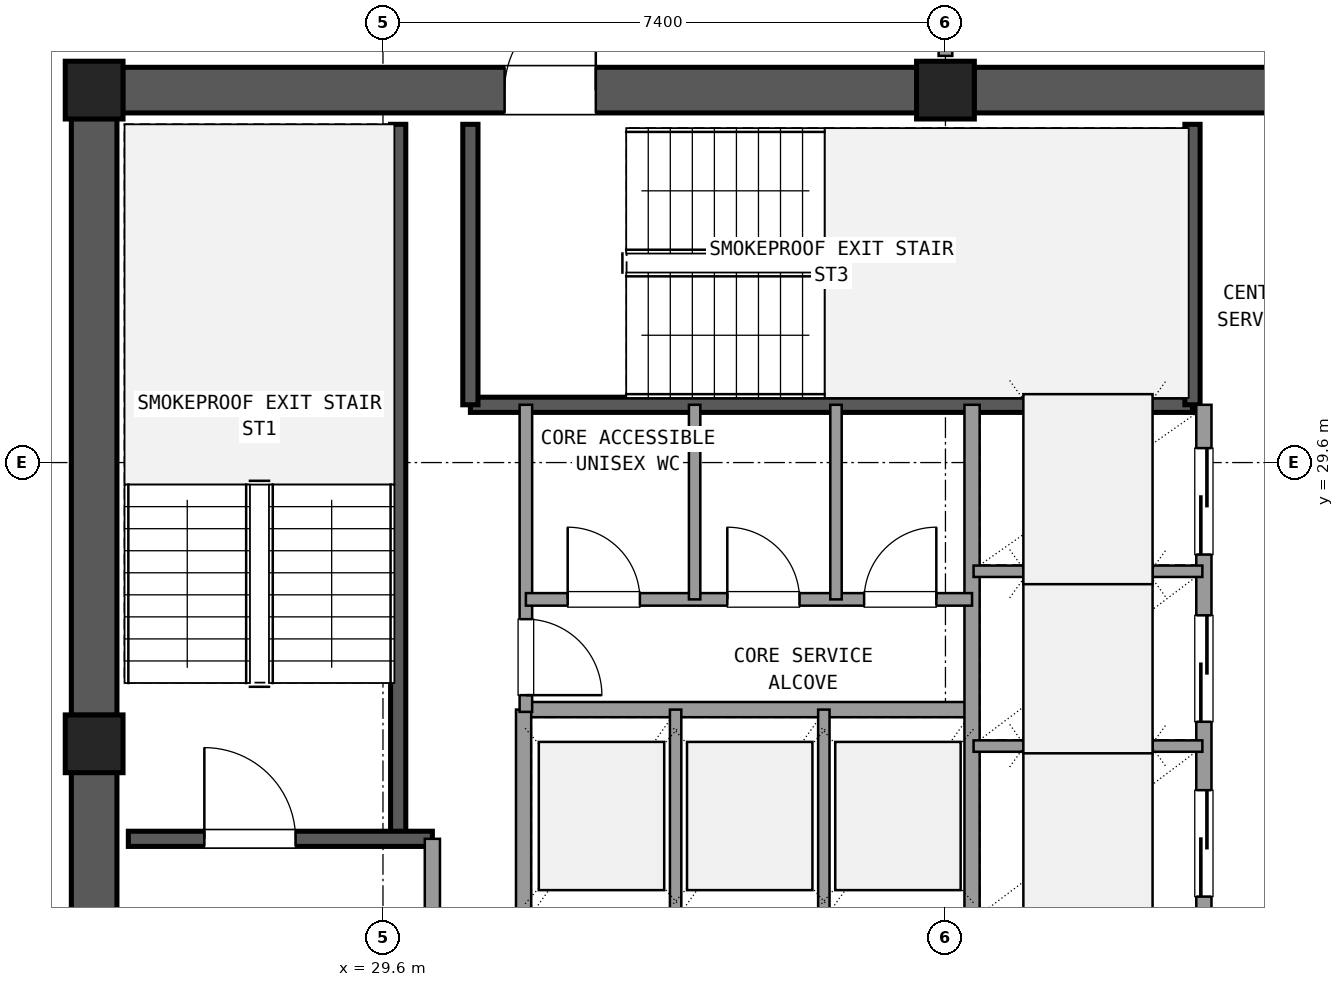
"""IFC4 building model, lengths in metres.
Left out: names, types, materials, properties, quantities, classifications, styles, units other than length and angle.
Written with IfcOpenShell. Run it as: python <this file> out.ifc"""

import sys

from ifc_helpers import new_model, si_unit, direction, frame, frame_2d, origin, origin_2d, place, context, subcontext, project, spatial, rectangle, extrude, element, fill, save


model = new_model("IFC4")
c1 = context("Model", 3, precision=1e-05, world=origin(), true_north=direction((0.0, 1.0)))
c2 = subcontext(c1, "Body", "Model", "MODEL_VIEW")
j1 = project(units=[si_unit("LENGTHUNIT", "METRE"), si_unit("PLANEANGLEUNIT", "RADIAN")], contexts=[c1])
p1 = place(None, origin())
s1 = spatial("IfcSite", under=j1, at=p1, CompositionType="ELEMENT")
p2 = place(p1, origin())
s2 = spatial("IfcBuilding", under=s1, at=p2, CompositionType="ELEMENT")
p3 = place(p2, frame((0.0, 0.0, 282.42)))
s3 = spatial("IfcBuildingStorey", under=s2, at=p3, CompositionType="ELEMENT", Elevation=282.42)
for number, where, z_axis, x_axis in (
    (1, (37.0, 34.5, 0.0), (0.0, 0.0, 1.0), (1.0, 0.0, 0.0)),
    (2, (25.8, 34.5, 0.0), (0.0, 0.0, 1.0), (1.0, 0.0, 0.0)),
    (3, (25.8, 25.9, 0.0), (0.0, 0.0, 1.0), (1.0, 0.0, 0.0)),
):
    element("IfcColumn", number, at=place(p3, frame(where, z_axis=z_axis, x_axis=x_axis)), inside=s3, PredefinedType="COLUMN", context=c2, shape_type="SweptSolid", body=[
        extrude(rectangle(XDim=0.76, YDim=0.76, at=origin_2d()), origin(), (0.0, 0.0, 1.0), 3.6),
    ])
p4 = place(p3, frame((47.825, 34.5, 0.0), z_axis=(0.0, 0.0, 1.0), x_axis=(-1.0, 0.0, 0.0)))
e4 = element("IfcWall", 4, at=p4, inside=s3, PredefinedType="SHEAR", context=c2, shape_type="SweptSolid", body=[
    extrude(rectangle(XDim=10.45, YDim=0.6, at=frame_2d((5.225, 0.0))), origin(), (0.0, 0.0, 1.0), 3.32),
])
p5 = place(p4, frame((4.725, 0.0, 0.0)))
e5 = element("IfcOpeningElement", 5, at=p5, cuts=e4, PredefinedType="OPENING", context=c2, shape_type="SweptSolid", body=[
    extrude(rectangle(XDim=1.6, YDim=2.2, at=frame_2d((0.8, 1.1))), frame((0.0, 0.31, 0.0), z_axis=(0.0, -1.0, 0.0), x_axis=(1.0, 0.0, 0.0)), (0.0, 0.0, 1.0), 0.62),
])
p6 = place(p3, frame((36.625, 34.5, 0.0), z_axis=(0.0, 0.0, 1.0), x_axis=(-1.0, 0.0, 0.0)))
e6 = element("IfcWall", 6, at=p6, inside=s3, PredefinedType="SHEAR", context=c2, shape_type="SweptSolid", body=[
    extrude(rectangle(XDim=10.45, YDim=0.6, at=frame_2d((5.225, 0.0))), origin(), (0.0, 0.0, 1.0), 3.32),
])
p7 = place(p6, frame((4.225, 0.0, 0.0)))
e7 = element("IfcOpeningElement", 7, at=p7, cuts=e6, PredefinedType="OPENING", context=c2, shape_type="SweptSolid", body=[
    extrude(rectangle(XDim=1.2, YDim=2.15, at=frame_2d((0.6, 1.075))), frame((0.0, 0.31, 0.0), z_axis=(0.0, -1.0, 0.0), x_axis=(1.0, 0.0, 0.0)), (0.0, 0.0, 1.0), 0.62),
])
p8 = place(p3, frame((25.8, 34.125, 0.0), z_axis=(0.0, 0.0, 1.0), x_axis=(0.0, -1.0, 0.0)))
e8 = element("IfcWall", 8, at=p8, inside=s3, PredefinedType="SHEAR", context=c2, shape_type="SweptSolid", body=[
    extrude(rectangle(XDim=7.85, YDim=0.6, at=frame_2d((3.925, 0.0))), origin(), (0.0, 0.0, 1.0), 3.32),
])
p9 = place(p3, frame((25.8, 25.525, 0.0), z_axis=(0.0, 0.0, 1.0), x_axis=(0.0, -1.0, 0.0)))
e9 = element("IfcWall", 9, at=p9, inside=s3, PredefinedType="SHEAR", context=c2, shape_type="SweptSolid", body=[
    extrude(rectangle(XDim=7.85, YDim=0.6, at=frame_2d((3.925, 0.0))), origin(), (0.0, 0.0, 1.0), 3.32),
])
p10 = place(p9, frame((2.275, 0.0, 0.0)))
e10 = element("IfcOpeningElement", 10, at=p10, cuts=e9, PredefinedType="OPENING", context=c2, shape_type="SweptSolid", body=[
    extrude(rectangle(XDim=1.2, YDim=2.15, at=frame_2d((0.6, 1.075))), frame((0.0, 0.31, 0.0), z_axis=(0.0, -1.0, 0.0), x_axis=(1.0, 0.0, 0.0)), (0.0, 0.0, 1.0), 0.62),
])
p11 = place(p3, frame((29.8, 24.65, 0.0), z_axis=(0.0, 0.0, 1.0), x_axis=(0.0, 1.0, 0.0)))
e11 = element("IfcWall", 11, at=p11, inside=s3, PredefinedType="SHEAR", context=c2, shape_type="SweptSolid", body=[
    extrude(rectangle(XDim=9.4, YDim=0.2, at=frame_2d((4.7, 0.0))), origin(), (0.0, 0.0, 1.0), 3.32),
])
p12 = place(p3, frame((26.25, 24.65, 0.0), z_axis=(0.0, 0.0, 1.0), x_axis=(1.0, 0.0, 0.0)))
e12 = element("IfcWall", 12, at=p12, inside=s3, PredefinedType="SHEAR", context=c2, shape_type="SweptSolid", body=[
    extrude(rectangle(XDim=4.0, YDim=0.2, at=frame_2d((2.0, 0.0))), origin(), (0.0, 0.0, 1.0), 3.32),
])
p13 = place(p12, frame((1.0, 0.0, 0.0)))
e13 = element("IfcOpeningElement", 13, at=p13, cuts=e12, PredefinedType="OPENING", context=c2, shape_type="SweptSolid", body=[
    extrude(rectangle(XDim=1.2, YDim=2.15, at=frame_2d((0.6, 1.075))), frame((0.0, 0.11, 0.0), z_axis=(0.0, -1.0, 0.0), x_axis=(1.0, 0.0, 0.0)), (0.0, 0.0, 1.0), 0.22),
])
p14 = place(p3, frame((30.75, 30.36, 0.0), z_axis=(0.0, 0.0, 1.0), x_axis=(1.0, 0.0, 0.0)))
e14 = element("IfcWall", 14, at=p14, inside=s3, PredefinedType="SHEAR", context=c2, shape_type="SweptSolid", body=[
    extrude(rectangle(XDim=9.5, YDim=0.2, at=frame_2d((4.75, 0.0))), origin(), (0.0, 0.0, 1.0), 3.32),
])
for number, where, z_axis, x_axis in (
    (15, (30.75, 30.36, 0.0), (0.0, 0.0, 1.0), (0.0, 1.0, 0.0)),
    (16, (40.25, 30.36, 0.0), (0.0, 0.0, 1.0), (0.0, 1.0, 0.0)),
):
    element("IfcWall", number, at=place(p3, frame(where, z_axis=z_axis, x_axis=x_axis)), inside=s3, PredefinedType="SHEAR", context=c2, shape_type="SweptSolid", body=[
        extrude(rectangle(XDim=3.69, YDim=0.2, at=frame_2d((1.845, 0.0))), origin(), (0.0, 0.0, 1.0), 3.32),
    ])
p15 = place(p3, frame((30.25, 17.75, 0.0), z_axis=(0.0, 0.0, 1.0), x_axis=(0.0, 1.0, 0.0)))
e17 = element("IfcWall", 17, at=p15, inside=s3, PredefinedType="SOLIDWALL", context=c2, shape_type="SweptSolid", body=[
    extrude(rectangle(XDim=6.9, YDim=0.2, at=frame_2d((3.45, 0.0))), origin(), (0.0, 0.0, 1.0), 2.24),
])
p16 = place(p15, frame((4.15, 0.0, 0.0)))
e18 = element("IfcOpeningElement", 18, at=p16, cuts=e17, PredefinedType="OPENING", context=c2, shape_type="SweptSolid", body=[
    extrude(rectangle(XDim=1.2, YDim=2.15, at=frame_2d((0.6, 1.075))), frame((0.0, 0.11, 0.0), z_axis=(0.0, -1.0, 0.0), x_axis=(1.0, 0.0, 0.0)), (0.0, 0.0, 1.0), 0.22),
])
p17 = place(p3, frame((31.45, 26.35, 0.0), z_axis=(0.0, 0.0, 1.0), x_axis=(1.0, 0.0, 0.0)))
e19 = element("IfcWall", 19, at=p17, inside=s3, PredefinedType="SOLIDWALL", context=c2, shape_type="SweptSolid", body=[
    extrude(rectangle(XDim=5.9, YDim=0.2, at=frame_2d((2.95, 0.0))), origin(), (0.0, 0.0, 1.0), 2.24),
])
p18 = place(p3, frame((31.45, 23.54, 0.0), z_axis=(0.0, 0.0, 1.0), x_axis=(0.0, 1.0, 0.0)))
e20 = element("IfcWall", 20, at=p18, inside=s3, PredefinedType="SOLIDWALL", context=c2, shape_type="SweptSolid", body=[
    extrude(rectangle(XDim=2.81, YDim=0.2, at=frame_2d((1.405, 0.0))), origin(), (0.0, 0.0, 1.0), 2.24),
])
for number, where, z_axis, x_axis in (
    (21, (33.45, 23.54, 0.0), (0.0, 0.0, 1.0), (0.0, 1.0, 0.0)),
    (22, (35.4, 23.54, 0.0), (0.0, 0.0, 1.0), (0.0, 1.0, 0.0)),
):
    element("IfcWall", number, at=place(p3, frame(where, z_axis=z_axis, x_axis=x_axis)), inside=s3, PredefinedType="PARTITIONING", context=c2, shape_type="SweptSolid", body=[
        extrude(rectangle(XDim=2.81, YDim=0.15, at=frame_2d((1.405, 0.0))), origin(), (0.0, 0.0, 1.0), 2.24),
    ])
p19 = place(p3, frame((37.35, 23.54, 0.0), z_axis=(0.0, 0.0, 1.0), x_axis=(0.0, 1.0, 0.0)))
e23 = element("IfcWall", 23, at=p19, inside=s3, PredefinedType="SOLIDWALL", context=c2, shape_type="SweptSolid", body=[
    extrude(rectangle(XDim=6.82, YDim=0.2, at=frame_2d((3.41, 0.0))), origin(), (0.0, 0.0, 1.0), 2.24),
])
p20 = place(p3, frame((40.4, 23.54, 0.0), z_axis=(0.0, 0.0, 1.0), x_axis=(0.0, 1.0, 0.0)))
e24 = element("IfcWall", 24, at=p20, inside=s3, PredefinedType="SOLIDWALL", context=c2, shape_type="SweptSolid", body=[
    extrude(rectangle(XDim=6.82, YDim=0.2, at=frame_2d((3.41, 0.0))), origin(), (0.0, 0.0, 1.0), 2.24),
])
p21 = place(p20, frame((0.35, 0.0, 0.0)))
e25 = element("IfcOpeningElement", 25, at=p21, cuts=e24, PredefinedType="OPENING", context=c2, shape_type="SweptSolid", body=[
    extrude(rectangle(XDim=1.4, YDim=2.2, at=frame_2d((0.7, 1.1))), frame((0.0, 0.11, 0.0), z_axis=(0.0, -1.0, 0.0), x_axis=(1.0, 0.0, 0.0)), (0.0, 0.0, 1.0), 0.22),
])
p22 = place(p20, frame((2.65, 0.0, 0.0)))
e26 = element("IfcOpeningElement", 26, at=p22, cuts=e24, PredefinedType="OPENING", context=c2, shape_type="SweptSolid", body=[
    extrude(rectangle(XDim=1.4, YDim=2.2, at=frame_2d((0.7, 1.1))), frame((0.0, 0.11, 0.0), z_axis=(0.0, -1.0, 0.0), x_axis=(1.0, 0.0, 0.0)), (0.0, 0.0, 1.0), 0.22),
])
p23 = place(p20, frame((4.85, 0.0, 0.0)))
e27 = element("IfcOpeningElement", 27, at=p23, cuts=e24, PredefinedType="OPENING", context=c2, shape_type="SweptSolid", body=[
    extrude(rectangle(XDim=1.4, YDim=2.2, at=frame_2d((0.7, 1.1))), frame((0.0, 0.11, 0.0), z_axis=(0.0, -1.0, 0.0), x_axis=(1.0, 0.0, 0.0)), (0.0, 0.0, 1.0), 0.22),
])
for number, where, z_axis, x_axis in (
    (28, (37.37, 25.87, 0.0), (0.0, 0.0, 1.0), (1.0, 0.0, 0.0)),
    (29, (37.37, 28.17, 0.0), (0.0, 0.0, 1.0), (1.0, 0.0, 0.0)),
):
    element("IfcWall", number, at=place(p3, frame(where, z_axis=z_axis, x_axis=x_axis)), inside=s3, PredefinedType="PARTITIONING", context=c2, shape_type="SweptSolid", body=[
        extrude(rectangle(XDim=3.01, YDim=0.15, at=frame_2d((1.505, 0.0))), origin(), (0.0, 0.0, 1.0), 2.24),
    ])
p24 = place(p3, frame((31.48, 26.32, 0.0), z_axis=(0.0, 0.0, 1.0), x_axis=(0.0, 1.0, 0.0)))
e30 = element("IfcWall", 30, at=p24, inside=s3, PredefinedType="PLUMBINGWALL", context=c2, shape_type="SweptSolid", body=[
    extrude(rectangle(XDim=4.04, YDim=0.165, at=frame_2d((2.02, 0.0))), origin(), (0.0, 0.0, 1.0), 2.24),
])
p25 = place(p24, frame((0.22, 0.0, 0.0)))
e31 = element("IfcOpeningElement", 31, at=p25, cuts=e30, PredefinedType="OPENING", context=c2, shape_type="SweptSolid", body=[
    extrude(rectangle(XDim=1.0, YDim=2.15, at=frame_2d((0.5, 1.075))), frame((0.0, 0.093, 0.0), z_axis=(0.0, -1.0, 0.0), x_axis=(1.0, 0.0, 0.0)), (0.0, 0.0, 1.0), 0.185),
])
p26 = place(p3, frame((31.48, 27.8, 0.0), z_axis=(0.0, 0.0, 1.0), x_axis=(1.0, 0.0, 0.0)))
e32 = element("IfcWall", 32, at=p26, inside=s3, PredefinedType="PLUMBINGWALL", context=c2, shape_type="SweptSolid", body=[
    extrude(rectangle(XDim=5.87, YDim=0.165, at=frame_2d((2.935, 0.0))), origin(), (0.0, 0.0, 1.0), 2.24),
])
p27 = place(p26, frame((0.55, 0.0, 0.0)))
e33 = element("IfcOpeningElement", 33, at=p27, cuts=e32, PredefinedType="OPENING", context=c2, shape_type="SweptSolid", body=[
    extrude(rectangle(XDim=0.95, YDim=2.1, at=frame_2d((0.475, 1.05))), frame((0.0, 0.093, 0.0), z_axis=(0.0, -1.0, 0.0), x_axis=(1.0, 0.0, 0.0)), (0.0, 0.0, 1.0), 0.185),
])
p28 = place(p26, frame((2.65, 0.0, 0.0)))
e34 = element("IfcOpeningElement", 34, at=p28, cuts=e32, PredefinedType="OPENING", context=c2, shape_type="SweptSolid", body=[
    extrude(rectangle(XDim=0.95, YDim=2.1, at=frame_2d((0.475, 1.05))), frame((0.0, 0.093, 0.0), z_axis=(0.0, -1.0, 0.0), x_axis=(1.0, 0.0, 0.0)), (0.0, 0.0, 1.0), 0.185),
])
p29 = place(p26, frame((4.45, 0.0, 0.0)))
e35 = element("IfcOpeningElement", 35, at=p29, cuts=e32, PredefinedType="OPENING", context=c2, shape_type="SweptSolid", body=[
    extrude(rectangle(XDim=0.95, YDim=2.1, at=frame_2d((0.475, 1.05))), frame((0.0, 0.093, 0.0), z_axis=(0.0, -1.0, 0.0), x_axis=(1.0, 0.0, 0.0)), (0.0, 0.0, 1.0), 0.185),
])
for number, where, z_axis, x_axis in (
    (36, (33.7, 27.8, 0.0), (0.0, 0.0, 1.0), (0.0, 1.0, 0.0)),
    (37, (35.56, 27.8, 0.0), (0.0, 0.0, 1.0), (0.0, 1.0, 0.0)),
):
    element("IfcWall", number, at=place(p3, frame(where, z_axis=z_axis, x_axis=x_axis)), inside=s3, PredefinedType="PARTITIONING", context=c2, shape_type="SweptSolid", body=[
        extrude(rectangle(XDim=2.56, YDim=0.15, at=frame_2d((1.28, 0.0))), origin(), (0.0, 0.0, 1.0), 2.24),
    ])
p30 = place(p3, frame((37.0, 34.95, 0.0), z_axis=(0.0, 0.0, 1.0), x_axis=(0.0, 1.0, 0.0)))
e38 = element("IfcWall", 38, at=p30, inside=s3, PredefinedType="PARTITIONING", context=c2, shape_type="SweptSolid", body=[
    extrude(rectangle(XDim=2.7, YDim=0.18, at=frame_2d((1.35, 0.0))), origin(), (0.0, 0.0, 1.0), 2.24),
])
p31 = place(p30, frame((0.35, 0.0, 0.0)))
e39 = element("IfcOpeningElement", 39, at=p31, cuts=e38, PredefinedType="OPENING", context=c2, shape_type="SweptSolid", body=[
    extrude(rectangle(XDim=2.0, YDim=2.2, at=frame_2d((1.0, 1.1))), frame((0.0, 0.1, 0.0), z_axis=(0.0, -1.0, 0.0), x_axis=(1.0, 0.0, 0.0)), (0.0, 0.0, 1.0), 0.2),
])
p32 = place(p13, origin())
e40 = element("IfcDoor", 40, at=p32, inside=s3, OperationType="SINGLE_SWING_LEFT", PredefinedType="DOOR", context=c2, shape_type="SweptSolid", body=[
    extrude(rectangle(XDim=1.2, YDim=2.15, at=frame_2d((0.6, 1.075))), frame((0.0, 0.025, 0.0), z_axis=(0.0, -1.0, 0.0), x_axis=(1.0, 0.0, 0.0)), (0.0, 0.0, 1.0), 0.05),
])
fill(e13, e40)
p33 = place(p7, frame((1.2, 0.0, 0.0), z_axis=(0.0, 0.0, 1.0), x_axis=(-1.0, 0.0, 0.0)))
e41 = element("IfcDoor", 41, at=p33, inside=s3, OperationType="SINGLE_SWING_LEFT", PredefinedType="DOOR", context=c2, shape_type="SweptSolid", body=[
    extrude(rectangle(XDim=1.2, YDim=2.15, at=frame_2d((0.6, 1.075))), frame((0.0, 0.025, 0.0), z_axis=(0.0, -1.0, 0.0), x_axis=(1.0, 0.0, 0.0)), (0.0, 0.0, 1.0), 0.05),
])
fill(e7, e41)
p34 = place(p21, origin())
e42 = element("IfcDoor", 42, at=p34, inside=s3, OperationType="SLIDING_TO_LEFT", PredefinedType="DOOR", context=c2, shape_type="SweptSolid", body=[
    extrude(rectangle(XDim=1.4, YDim=2.2, at=frame_2d((0.7, 1.1))), frame((0.0, 0.025, 0.0), z_axis=(0.0, -1.0, 0.0), x_axis=(1.0, 0.0, 0.0)), (0.0, 0.0, 1.0), 0.05),
])
fill(e25, e42)
p35 = place(p22, origin())
e43 = element("IfcDoor", 43, at=p35, inside=s3, OperationType="SLIDING_TO_LEFT", PredefinedType="DOOR", context=c2, shape_type="SweptSolid", body=[
    extrude(rectangle(XDim=1.4, YDim=2.2, at=frame_2d((0.7, 1.1))), frame((0.0, 0.025, 0.0), z_axis=(0.0, -1.0, 0.0), x_axis=(1.0, 0.0, 0.0)), (0.0, 0.0, 1.0), 0.05),
])
fill(e26, e43)
p36 = place(p23, origin())
e44 = element("IfcDoor", 44, at=p36, inside=s3, OperationType="SLIDING_TO_RIGHT", PredefinedType="DOOR", context=c2, shape_type="SweptSolid", body=[
    extrude(rectangle(XDim=1.4, YDim=2.2, at=frame_2d((0.7, 1.1))), frame((0.0, 0.025, 0.0), z_axis=(0.0, -1.0, 0.0), x_axis=(1.0, 0.0, 0.0)), (0.0, 0.0, 1.0), 0.05),
])
fill(e27, e44)
p37 = place(p25, frame((1.0, 0.0, 0.0), z_axis=(0.0, 0.0, 1.0), x_axis=(-1.0, 0.0, 0.0)))
e45 = element("IfcDoor", 45, at=p37, inside=s3, OperationType="SINGLE_SWING_LEFT", PredefinedType="DOOR", context=c2, shape_type="SweptSolid", body=[
    extrude(rectangle(XDim=1.0, YDim=2.15, at=frame_2d((0.5, 1.075))), frame((0.0, 0.025, 0.0), z_axis=(0.0, -1.0, 0.0), x_axis=(1.0, 0.0, 0.0)), (0.0, 0.0, 1.0), 0.05),
])
fill(e31, e45)
p38 = place(p27, origin())
e46 = element("IfcDoor", 46, at=p38, inside=s3, OperationType="SINGLE_SWING_LEFT", PredefinedType="DOOR", context=c2, shape_type="SweptSolid", body=[
    extrude(rectangle(XDim=0.95, YDim=2.1, at=frame_2d((0.475, 1.05))), frame((0.0, 0.025, 0.0), z_axis=(0.0, -1.0, 0.0), x_axis=(1.0, 0.0, 0.0)), (0.0, 0.0, 1.0), 0.05),
])
fill(e33, e46)
p39 = place(p28, origin())
e47 = element("IfcDoor", 47, at=p39, inside=s3, OperationType="SINGLE_SWING_LEFT", PredefinedType="DOOR", context=c2, shape_type="SweptSolid", body=[
    extrude(rectangle(XDim=0.95, YDim=2.1, at=frame_2d((0.475, 1.05))), frame((0.0, 0.025, 0.0), z_axis=(0.0, -1.0, 0.0), x_axis=(1.0, 0.0, 0.0)), (0.0, 0.0, 1.0), 0.05),
])
fill(e34, e47)
p40 = place(p29, origin())
e48 = element("IfcDoor", 48, at=p40, inside=s3, OperationType="SINGLE_SWING_RIGHT", PredefinedType="DOOR", context=c2, shape_type="SweptSolid", body=[
    extrude(rectangle(XDim=0.95, YDim=2.1, at=frame_2d((0.475, 1.05))), frame((0.0, 0.025, 0.0), z_axis=(0.0, -1.0, 0.0), x_axis=(1.0, 0.0, 0.0)), (0.0, 0.0, 1.0), 0.05),
])
fill(e35, e48)
save(model, sys.argv[1])
